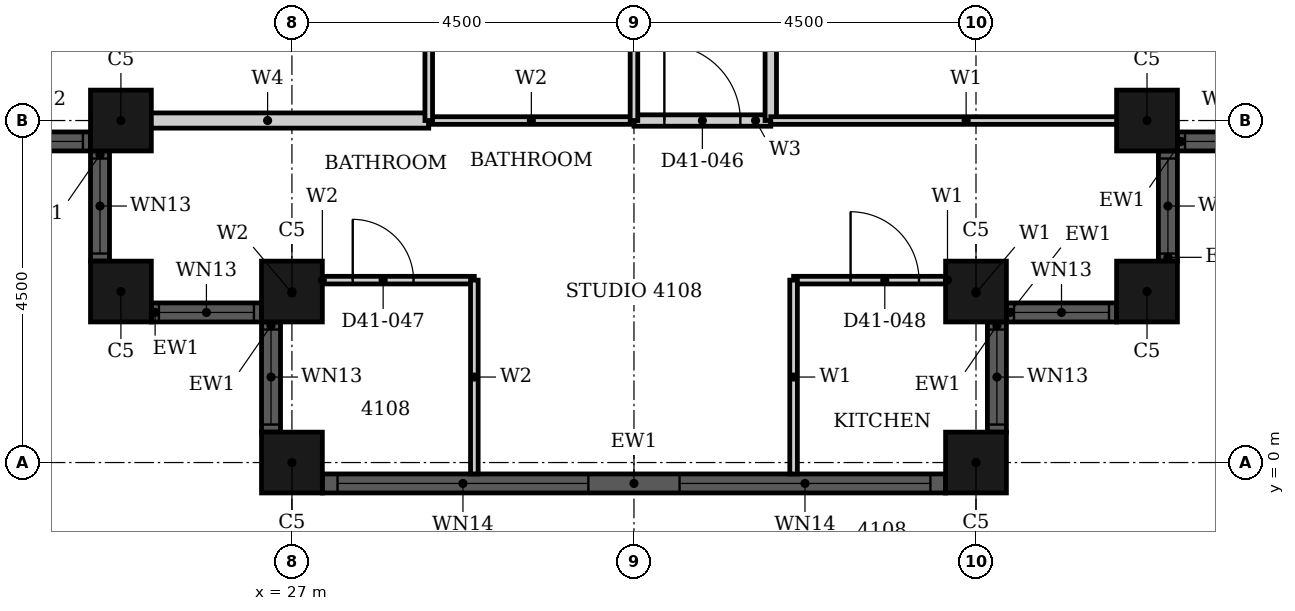
"""IFC4 building model, lengths in metres.
Left out: names, types, materials, properties, quantities, classifications, styles, units other than length and angle.
Written with IfcOpenShell. Run it as: python <this file> out.ifc"""

import sys

from ifc_helpers import new_model, si_unit, direction, frame, frame_2d, origin, origin_2d, place, context, subcontext, project, spatial, rectangle, hollow_rectangle, extrude, element, fill, save


model = new_model("IFC4")
c1 = context("Model", 3, precision=1e-05, world=origin(), true_north=direction((0.0, 1.0)))
c2 = subcontext(c1, "Body", "Model", "MODEL_VIEW")
j1 = project(units=[si_unit("LENGTHUNIT", "METRE"), si_unit("PLANEANGLEUNIT", "RADIAN")], contexts=[c1])
p1 = place(None, origin())
s1 = spatial("IfcSite", under=j1, at=p1, CompositionType="ELEMENT")
p2 = place(p1, origin())
s2 = spatial("IfcBuilding", under=s1, at=p2, CompositionType="ELEMENT")
p3 = place(p2, frame((0.0, 0.0, 165.4)))
s3 = spatial("IfcBuildingStorey", under=s2, at=p3, CompositionType="ELEMENT", Elevation=165.4)
for number, where, z_axis, x_axis in (
    (1, (24.75, 4.5, 0.0), (0.0, 0.0, 1.0), (1.0, 0.0, 0.0)),
    (2, (24.75, 2.25, 0.0), (0.0, 0.0, 1.0), (1.0, 0.0, 0.0)),
    (3, (27.0, 2.25, 0.0), (0.0, 0.0, 1.0), (1.0, 0.0, 0.0)),
    (4, (27.0, 0.0, 0.0), (0.0, 0.0, 1.0), (1.0, 0.0, 0.0)),
    (5, (36.0, 0.0, 0.0), (0.0, 0.0, 1.0), (1.0, 0.0, 0.0)),
    (6, (36.0, 2.25, 0.0), (0.0, 0.0, 1.0), (1.0, 0.0, 0.0)),
    (7, (38.25, 2.25, 0.0), (0.0, 0.0, 1.0), (1.0, 0.0, 0.0)),
    (8, (38.25, 4.5, 0.0), (0.0, 0.0, 1.0), (1.0, 0.0, 0.0)),
):
    element("IfcColumn", number, at=place(p3, frame(where, z_axis=z_axis, x_axis=x_axis)), inside=s3, PredefinedType="COLUMN", context=c2, shape_type="SweptSolid", body=[
        extrude(hollow_rectangle(XDim=0.8, YDim=0.8, WallThickness=0.025, at=origin_2d()), origin(), (0.0, 0.0, 1.0), 3.7),
    ])
p4 = place(p3, frame((22.9, 4.225, 0.0), z_axis=(0.0, 0.0, 1.0), x_axis=(1.0, 0.0, 0.0)))
e9 = element("IfcWall", 9, at=p4, inside=s3, PredefinedType="SOLIDWALL", context=c2, shape_type="SweptSolid", body=[
    extrude(rectangle(XDim=1.45, YDim=0.25, at=frame_2d((0.725, 0.0))), origin(), (0.0, 0.0, 1.0), 3.7),
])
p5 = place(p4, frame((0.1, 0.0, 0.9)))
e10 = element("IfcOpeningElement", 10, at=p5, cuts=e9, PredefinedType="OPENING", context=c2, shape_type="SweptSolid", body=[
    extrude(rectangle(XDim=1.25, YDim=2.08, at=frame_2d((0.625, 1.04))), frame((0.0, 0.135, 0.0), z_axis=(0.0, -1.0, 0.0), x_axis=(1.0, 0.0, 0.0)), (0.0, 0.0, 1.0), 0.27),
])
p6 = place(p3, frame((24.475, 4.1, 0.0), z_axis=(0.0, 0.0, 1.0), x_axis=(0.0, -1.0, 0.0)))
e11 = element("IfcWall", 11, at=p6, inside=s3, PredefinedType="SOLIDWALL", context=c2, shape_type="SweptSolid", body=[
    extrude(rectangle(XDim=1.45, YDim=0.25, at=frame_2d((0.725, 0.0))), origin(), (0.0, 0.0, 1.0), 3.7),
])
p7 = place(p6, frame((0.1, 0.0, 0.9)))
e12 = element("IfcOpeningElement", 12, at=p7, cuts=e11, PredefinedType="OPENING", context=c2, shape_type="SweptSolid", body=[
    extrude(rectangle(XDim=1.25, YDim=1.85, at=frame_2d((0.625, 0.925))), frame((0.0, 0.135, 0.0), z_axis=(0.0, -1.0, 0.0), x_axis=(1.0, 0.0, 0.0)), (0.0, 0.0, 1.0), 0.27),
])
p8 = place(p3, frame((25.15, 1.975, 0.0), z_axis=(0.0, 0.0, 1.0), x_axis=(1.0, 0.0, 0.0)))
e13 = element("IfcWall", 13, at=p8, inside=s3, PredefinedType="SOLIDWALL", context=c2, shape_type="SweptSolid", body=[
    extrude(rectangle(XDim=1.45, YDim=0.25, at=frame_2d((0.725, 0.0))), origin(), (0.0, 0.0, 1.0), 3.7),
])
p9 = place(p8, frame((0.1, 0.0, 0.9)))
e14 = element("IfcOpeningElement", 14, at=p9, cuts=e13, PredefinedType="OPENING", context=c2, shape_type="SweptSolid", body=[
    extrude(rectangle(XDim=1.25, YDim=1.85, at=frame_2d((0.625, 0.925))), frame((0.0, 0.135, 0.0), z_axis=(0.0, -1.0, 0.0), x_axis=(1.0, 0.0, 0.0)), (0.0, 0.0, 1.0), 0.27),
])
p10 = place(p3, frame((26.725, 1.85, 0.0), z_axis=(0.0, 0.0, 1.0), x_axis=(0.0, -1.0, 0.0)))
e15 = element("IfcWall", 15, at=p10, inside=s3, PredefinedType="SOLIDWALL", context=c2, shape_type="SweptSolid", body=[
    extrude(rectangle(XDim=1.45, YDim=0.25, at=frame_2d((0.725, 0.0))), origin(), (0.0, 0.0, 1.0), 3.7),
])
p11 = place(p10, frame((0.1, 0.0, 0.9)))
e16 = element("IfcOpeningElement", 16, at=p11, cuts=e15, PredefinedType="OPENING", context=c2, shape_type="SweptSolid", body=[
    extrude(rectangle(XDim=1.25, YDim=1.85, at=frame_2d((0.625, 0.925))), frame((0.0, 0.135, 0.0), z_axis=(0.0, -1.0, 0.0), x_axis=(1.0, 0.0, 0.0)), (0.0, 0.0, 1.0), 0.27),
])
p12 = place(p3, frame((27.4, -0.275, 0.0), z_axis=(0.0, 0.0, 1.0), x_axis=(1.0, 0.0, 0.0)))
e17 = element("IfcWall", 17, at=p12, inside=s3, PredefinedType="SOLIDWALL", context=c2, shape_type="SweptSolid", body=[
    extrude(rectangle(XDim=8.2, YDim=0.25, at=frame_2d((4.1, 0.0))), origin(), (0.0, 0.0, 1.0), 3.7),
])
p13 = place(p12, frame((0.2, 0.0, 0.45)))
e18 = element("IfcOpeningElement", 18, at=p13, cuts=e17, PredefinedType="OPENING", context=c2, shape_type="SweptSolid", body=[
    extrude(rectangle(XDim=3.3, YDim=2.53, at=frame_2d((1.65, 1.265))), frame((0.0, 0.135, 0.0), z_axis=(0.0, -1.0, 0.0), x_axis=(1.0, 0.0, 0.0)), (0.0, 0.0, 1.0), 0.27),
])
p14 = place(p12, frame((4.7, 0.0, 0.45)))
e19 = element("IfcOpeningElement", 19, at=p14, cuts=e17, PredefinedType="OPENING", context=c2, shape_type="SweptSolid", body=[
    extrude(rectangle(XDim=3.3, YDim=2.53, at=frame_2d((1.65, 1.265))), frame((0.0, 0.135, 0.0), z_axis=(0.0, -1.0, 0.0), x_axis=(1.0, 0.0, 0.0)), (0.0, 0.0, 1.0), 0.27),
])
p15 = place(p3, frame((36.275, 0.4, 0.0), z_axis=(0.0, 0.0, 1.0), x_axis=(0.0, 1.0, 0.0)))
e20 = element("IfcWall", 20, at=p15, inside=s3, PredefinedType="SOLIDWALL", context=c2, shape_type="SweptSolid", body=[
    extrude(rectangle(XDim=1.45, YDim=0.25, at=frame_2d((0.725, 0.0))), origin(), (0.0, 0.0, 1.0), 3.7),
])
p16 = place(p15, frame((0.1, 0.0, 0.9)))
e21 = element("IfcOpeningElement", 21, at=p16, cuts=e20, PredefinedType="OPENING", context=c2, shape_type="SweptSolid", body=[
    extrude(rectangle(XDim=1.25, YDim=1.85, at=frame_2d((0.625, 0.925))), frame((0.0, 0.135, 0.0), z_axis=(0.0, -1.0, 0.0), x_axis=(1.0, 0.0, 0.0)), (0.0, 0.0, 1.0), 0.27),
])
p17 = place(p3, frame((36.4, 1.975, 0.0), z_axis=(0.0, 0.0, 1.0), x_axis=(1.0, 0.0, 0.0)))
e22 = element("IfcWall", 22, at=p17, inside=s3, PredefinedType="SOLIDWALL", context=c2, shape_type="SweptSolid", body=[
    extrude(rectangle(XDim=1.45, YDim=0.25, at=frame_2d((0.725, 0.0))), origin(), (0.0, 0.0, 1.0), 3.7),
])
p18 = place(p17, frame((0.1, 0.0, 0.9)))
e23 = element("IfcOpeningElement", 23, at=p18, cuts=e22, PredefinedType="OPENING", context=c2, shape_type="SweptSolid", body=[
    extrude(rectangle(XDim=1.25, YDim=1.85, at=frame_2d((0.625, 0.925))), frame((0.0, 0.135, 0.0), z_axis=(0.0, -1.0, 0.0), x_axis=(1.0, 0.0, 0.0)), (0.0, 0.0, 1.0), 0.27),
])
p19 = place(p3, frame((38.525, 2.65, 0.0), z_axis=(0.0, 0.0, 1.0), x_axis=(0.0, 1.0, 0.0)))
e24 = element("IfcWall", 24, at=p19, inside=s3, PredefinedType="SOLIDWALL", context=c2, shape_type="SweptSolid", body=[
    extrude(rectangle(XDim=1.45, YDim=0.25, at=frame_2d((0.725, 0.0))), origin(), (0.0, 0.0, 1.0), 3.7),
])
p20 = place(p19, frame((0.1, 0.0, 0.9)))
e25 = element("IfcOpeningElement", 25, at=p20, cuts=e24, PredefinedType="OPENING", context=c2, shape_type="SweptSolid", body=[
    extrude(rectangle(XDim=1.25, YDim=1.85, at=frame_2d((0.625, 0.925))), frame((0.0, 0.135, 0.0), z_axis=(0.0, -1.0, 0.0), x_axis=(1.0, 0.0, 0.0)), (0.0, 0.0, 1.0), 0.27),
])
p21 = place(p3, frame((38.65, 4.225, 0.0), z_axis=(0.0, 0.0, 1.0), x_axis=(1.0, 0.0, 0.0)))
e26 = element("IfcWall", 26, at=p21, inside=s3, PredefinedType="SOLIDWALL", context=c2, shape_type="SweptSolid", body=[
    extrude(rectangle(XDim=1.45, YDim=0.25, at=frame_2d((0.725, 0.0))), origin(), (0.0, 0.0, 1.0), 3.7),
])
p22 = place(p21, frame((0.1, 0.0, 0.9)))
e27 = element("IfcOpeningElement", 27, at=p22, cuts=e26, PredefinedType="OPENING", context=c2, shape_type="SweptSolid", body=[
    extrude(rectangle(XDim=1.25, YDim=2.08, at=frame_2d((0.625, 1.04))), frame((0.0, 0.135, 0.0), z_axis=(0.0, -1.0, 0.0), x_axis=(1.0, 0.0, 0.0)), (0.0, 0.0, 1.0), 0.27),
])
p23 = place(p3, frame((31.5, 4.5, 0.0), z_axis=(0.0, 0.0, 1.0), x_axis=(1.0, 0.0, 0.0)))
e28 = element("IfcWall", 28, at=p23, inside=s3, PredefinedType="PARTITIONING", context=c2, shape_type="SweptSolid", body=[
    extrude(rectangle(XDim=1.8, YDim=0.15, at=frame_2d((0.9, 0.0))), origin(), (0.0, 0.0, 1.0), 3.4),
])
p24 = place(p23, frame((0.4, 0.0, 0.0)))
e29 = element("IfcOpeningElement", 29, at=p24, cuts=e28, PredefinedType="OPENING", context=c2, shape_type="SweptSolid", body=[
    extrude(rectangle(XDim=1.0, YDim=2.2, at=frame_2d((0.5, 1.1))), frame((0.0, 0.085, 0.0), z_axis=(0.0, -1.0, 0.0), x_axis=(1.0, 0.0, 0.0)), (0.0, 0.0, 1.0), 0.17),
])
p25 = place(p3, frame((33.3, 4.5, 0.0), z_axis=(0.0, 0.0, 1.0), x_axis=(0.0, 1.0, 0.0)))
e30 = element("IfcWall", 30, at=p25, inside=s3, PredefinedType="PARTITIONING", context=c2, shape_type="SweptSolid", body=[
    extrude(rectangle(XDim=16.199, YDim=0.15, at=frame_2d((8.1, 0.0))), origin(), (0.0, 0.0, 1.0), 3.4),
])
p26 = place(p25, frame((12.099, 0.0, 0.0)))
e31 = element("IfcOpeningElement", 31, at=p26, cuts=e30, PredefinedType="OPENING", context=c2, shape_type="SweptSolid", body=[
    extrude(rectangle(XDim=1.0, YDim=2.2, at=frame_2d((0.5, 1.1))), frame((0.0, 0.085, 0.0), z_axis=(0.0, -1.0, 0.0), x_axis=(1.0, 0.0, 0.0)), (0.0, 0.0, 1.0), 0.17),
])
p27 = place(p25, frame((4.0, 0.0, 0.0)))
e32 = element("IfcOpeningElement", 32, at=p27, cuts=e30, PredefinedType="OPENING", context=c2, shape_type="SweptSolid", body=[
    extrude(rectangle(XDim=1.0, YDim=2.1, at=frame_2d((0.5, 1.05))), frame((0.0, 0.085, 0.0), z_axis=(0.0, -1.0, 0.0), x_axis=(1.0, 0.0, 0.0)), (0.0, 0.0, 1.0), 0.17),
])
p28 = place(p3, frame((33.6, 2.4, 0.0), z_axis=(0.0, 0.0, 1.0), x_axis=(1.0, 0.0, 0.0)))
e33 = element("IfcWall", 33, at=p28, inside=s3, PredefinedType="PARTITIONING", context=c2, shape_type="SweptSolid", body=[
    extrude(rectangle(XDim=2.4, YDim=0.1, at=frame_2d((1.2, 0.0))), origin(), (0.0, 0.0, 1.0), 3.4),
])
p29 = place(p28, frame((0.75, 0.0, 0.0)))
e34 = element("IfcOpeningElement", 34, at=p29, cuts=e33, PredefinedType="OPENING", context=c2, shape_type="SweptSolid", body=[
    extrude(rectangle(XDim=0.9, YDim=2.1, at=frame_2d((0.45, 1.05))), frame((0.0, 0.06, 0.0), z_axis=(0.0, -1.0, 0.0), x_axis=(1.0, 0.0, 0.0)), (0.0, 0.0, 1.0), 0.12),
])
p30 = place(p3, frame((33.3, 4.5, 0.0), z_axis=(0.0, 0.0, 1.0), x_axis=(1.0, 0.0, 0.0)))
e35 = element("IfcWall", 35, at=p30, inside=s3, PredefinedType="PARTITIONING", context=c2, shape_type="SweptSolid", body=[
    extrude(rectangle(XDim=5.14, YDim=0.1, at=frame_2d((2.57, 0.0))), origin(), (0.0, 0.0, 1.0), 3.4),
])
p31 = place(p3, frame((33.6, -0.15, 0.0), z_axis=(0.0, 0.0, 1.0), x_axis=(0.0, 1.0, 0.0)))
e36 = element("IfcWall", 36, at=p31, inside=s3, PredefinedType="PARTITIONING", context=c2, shape_type="SweptSolid", body=[
    extrude(rectangle(XDim=2.55, YDim=0.1, at=frame_2d((1.275, 0.0))), origin(), (0.0, 0.0, 1.0), 3.4),
])
p32 = place(p3, frame((36.0, 2.06, 0.0), z_axis=(0.0, 0.0, 1.0), x_axis=(0.0, 1.0, 0.0)))
e37 = element("IfcWall", 37, at=p32, inside=s3, PredefinedType="PARTITIONING", context=c2, shape_type="SweptSolid", body=[
    extrude(rectangle(XDim=0.34, YDim=0.1, at=frame_2d((0.17, 0.0))), origin(), (0.0, 0.0, 1.0), 3.4),
])
p33 = place(p3, frame((24.56, 4.5, 0.0), z_axis=(0.0, 0.0, 1.0), x_axis=(1.0, 0.0, 0.0)))
e38 = element("IfcWall", 38, at=p33, inside=s3, PredefinedType="PARTITIONING", context=c2, shape_type="SweptSolid", body=[
    extrude(rectangle(XDim=4.24, YDim=0.2, at=frame_2d((2.12, 0.0))), origin(), (0.0, 0.0, 1.0), 3.4),
])
p34 = place(p3, frame((27.0, 2.4, 0.0), z_axis=(0.0, 0.0, 1.0), x_axis=(1.0, 0.0, 0.0)))
e39 = element("IfcWall", 39, at=p34, inside=s3, PredefinedType="PARTITIONING", context=c2, shape_type="SweptSolid", body=[
    extrude(rectangle(XDim=2.4, YDim=0.1, at=frame_2d((1.2, 0.0))), origin(), (0.0, 0.0, 1.0), 3.4),
])
p35 = place(p34, frame((0.8, 0.0, 0.0)))
e40 = element("IfcOpeningElement", 40, at=p35, cuts=e39, PredefinedType="OPENING", context=c2, shape_type="SweptSolid", body=[
    extrude(rectangle(XDim=0.8, YDim=2.1, at=frame_2d((0.4, 1.05))), frame((0.0, 0.06, 0.0), z_axis=(0.0, -1.0, 0.0), x_axis=(1.0, 0.0, 0.0)), (0.0, 0.0, 1.0), 0.12),
])
p36 = place(p3, frame((28.8, 4.5, 0.0), z_axis=(0.0, 0.0, 1.0), x_axis=(1.0, 0.0, 0.0)))
e41 = element("IfcWall", 41, at=p36, inside=s3, PredefinedType="PARTITIONING", context=c2, shape_type="SweptSolid", body=[
    extrude(rectangle(XDim=2.7, YDim=0.1, at=frame_2d((1.35, 0.0))), origin(), (0.0, 0.0, 1.0), 3.4),
])
p37 = place(p3, frame((27.0, 2.06, 0.0), z_axis=(0.0, 0.0, 1.0), x_axis=(0.0, 1.0, 0.0)))
e42 = element("IfcWall", 42, at=p37, inside=s3, PredefinedType="PARTITIONING", context=c2, shape_type="SweptSolid", body=[
    extrude(rectangle(XDim=0.34, YDim=0.1, at=frame_2d((0.17, 0.0))), origin(), (0.0, 0.0, 1.0), 3.4),
])
p38 = place(p3, frame((28.8, 4.5, 0.0), z_axis=(0.0, 0.0, 1.0), x_axis=(0.0, 1.0, 0.0)))
e43 = element("IfcWall", 43, at=p38, inside=s3, PredefinedType="PARTITIONING", context=c2, shape_type="SweptSolid", body=[
    extrude(rectangle(XDim=2.4, YDim=0.1, at=frame_2d((1.2, 0.0))), origin(), (0.0, 0.0, 1.0), 3.4),
])
p39 = place(p3, frame((29.4, -0.15, 0.0), z_axis=(0.0, 0.0, 1.0), x_axis=(0.0, 1.0, 0.0)))
e44 = element("IfcWall", 44, at=p39, inside=s3, PredefinedType="PARTITIONING", context=c2, shape_type="SweptSolid", body=[
    extrude(rectangle(XDim=2.55, YDim=0.1, at=frame_2d((1.275, 0.0))), origin(), (0.0, 0.0, 1.0), 3.4),
])
p40 = place(p3, frame((31.5, 4.5, 0.0), z_axis=(0.0, 0.0, 1.0), x_axis=(0.0, 1.0, 0.0)))
e45 = element("IfcWall", 45, at=p40, inside=s3, PredefinedType="PARTITIONING", context=c2, shape_type="SweptSolid", body=[
    extrude(rectangle(XDim=2.4, YDim=0.1, at=frame_2d((1.2, 0.0))), origin(), (0.0, 0.0, 1.0), 2.68),
])
p41 = place(p5, origin())
e46 = element("IfcWindow", 46, at=p41, inside=s3, PartitioningType="SINGLE_PANEL", PredefinedType="WINDOW", context=c2, shape_type="SweptSolid", body=[
    extrude(rectangle(XDim=1.25, YDim=2.08, at=frame_2d((0.625, 1.04))), frame((0.0, 0.03, 0.0), z_axis=(0.0, -1.0, 0.0), x_axis=(1.0, 0.0, 0.0)), (0.0, 0.0, 1.0), 0.06),
])
fill(e10, e46)
p42 = place(p7, origin())
e47 = element("IfcWindow", 47, at=p42, inside=s3, PartitioningType="SINGLE_PANEL", PredefinedType="WINDOW", context=c2, shape_type="SweptSolid", body=[
    extrude(rectangle(XDim=1.25, YDim=1.85, at=frame_2d((0.625, 0.925))), frame((0.0, 0.03, 0.0), z_axis=(0.0, -1.0, 0.0), x_axis=(1.0, 0.0, 0.0)), (0.0, 0.0, 1.0), 0.06),
])
fill(e12, e47)
p43 = place(p9, origin())
e48 = element("IfcWindow", 48, at=p43, inside=s3, PartitioningType="SINGLE_PANEL", PredefinedType="WINDOW", context=c2, shape_type="SweptSolid", body=[
    extrude(rectangle(XDim=1.25, YDim=1.85, at=frame_2d((0.625, 0.925))), frame((0.0, 0.03, 0.0), z_axis=(0.0, -1.0, 0.0), x_axis=(1.0, 0.0, 0.0)), (0.0, 0.0, 1.0), 0.06),
])
fill(e14, e48)
p44 = place(p11, origin())
e49 = element("IfcWindow", 49, at=p44, inside=s3, PartitioningType="SINGLE_PANEL", PredefinedType="WINDOW", context=c2, shape_type="SweptSolid", body=[
    extrude(rectangle(XDim=1.25, YDim=1.85, at=frame_2d((0.625, 0.925))), frame((0.0, 0.03, 0.0), z_axis=(0.0, -1.0, 0.0), x_axis=(1.0, 0.0, 0.0)), (0.0, 0.0, 1.0), 0.06),
])
fill(e16, e49)
p45 = place(p13, origin())
e50 = element("IfcWindow", 50, at=p45, inside=s3, PartitioningType="SINGLE_PANEL", PredefinedType="WINDOW", context=c2, shape_type="SweptSolid", body=[
    extrude(rectangle(XDim=3.3, YDim=2.53, at=frame_2d((1.65, 1.265))), frame((0.0, 0.03, 0.0), z_axis=(0.0, -1.0, 0.0), x_axis=(1.0, 0.0, 0.0)), (0.0, 0.0, 1.0), 0.06),
])
fill(e18, e50)
p46 = place(p14, origin())
e51 = element("IfcWindow", 51, at=p46, inside=s3, PartitioningType="SINGLE_PANEL", PredefinedType="WINDOW", context=c2, shape_type="SweptSolid", body=[
    extrude(rectangle(XDim=3.3, YDim=2.53, at=frame_2d((1.65, 1.265))), frame((0.0, 0.03, 0.0), z_axis=(0.0, -1.0, 0.0), x_axis=(1.0, 0.0, 0.0)), (0.0, 0.0, 1.0), 0.06),
])
fill(e19, e51)
p47 = place(p16, origin())
e52 = element("IfcWindow", 52, at=p47, inside=s3, PartitioningType="SINGLE_PANEL", PredefinedType="WINDOW", context=c2, shape_type="SweptSolid", body=[
    extrude(rectangle(XDim=1.25, YDim=1.85, at=frame_2d((0.625, 0.925))), frame((0.0, 0.03, 0.0), z_axis=(0.0, -1.0, 0.0), x_axis=(1.0, 0.0, 0.0)), (0.0, 0.0, 1.0), 0.06),
])
fill(e21, e52)
p48 = place(p18, origin())
e53 = element("IfcWindow", 53, at=p48, inside=s3, PartitioningType="SINGLE_PANEL", PredefinedType="WINDOW", context=c2, shape_type="SweptSolid", body=[
    extrude(rectangle(XDim=1.25, YDim=1.85, at=frame_2d((0.625, 0.925))), frame((0.0, 0.03, 0.0), z_axis=(0.0, -1.0, 0.0), x_axis=(1.0, 0.0, 0.0)), (0.0, 0.0, 1.0), 0.06),
])
fill(e23, e53)
p49 = place(p20, origin())
e54 = element("IfcWindow", 54, at=p49, inside=s3, PartitioningType="SINGLE_PANEL", PredefinedType="WINDOW", context=c2, shape_type="SweptSolid", body=[
    extrude(rectangle(XDim=1.25, YDim=1.85, at=frame_2d((0.625, 0.925))), frame((0.0, 0.03, 0.0), z_axis=(0.0, -1.0, 0.0), x_axis=(1.0, 0.0, 0.0)), (0.0, 0.0, 1.0), 0.06),
])
fill(e25, e54)
p50 = place(p22, origin())
e55 = element("IfcWindow", 55, at=p50, inside=s3, PartitioningType="SINGLE_PANEL", PredefinedType="WINDOW", context=c2, shape_type="SweptSolid", body=[
    extrude(rectangle(XDim=1.25, YDim=2.08, at=frame_2d((0.625, 1.04))), frame((0.0, 0.03, 0.0), z_axis=(0.0, -1.0, 0.0), x_axis=(1.0, 0.0, 0.0)), (0.0, 0.0, 1.0), 0.06),
])
fill(e27, e55)
p51 = place(p24, origin())
e56 = element("IfcDoor", 56, at=p51, inside=s3, OperationType="SINGLE_SWING_LEFT", PredefinedType="DOOR", context=c2, shape_type="SweptSolid", body=[
    extrude(rectangle(XDim=1.0, YDim=2.2, at=frame_2d((0.5, 1.1))), frame((0.0, 0.025, 0.0), z_axis=(0.0, -1.0, 0.0), x_axis=(1.0, 0.0, 0.0)), (0.0, 0.0, 1.0), 0.05),
])
fill(e29, e56)
p52 = place(p35, origin())
e57 = element("IfcDoor", 57, at=p52, inside=s3, OperationType="SINGLE_SWING_RIGHT", PredefinedType="DOOR", context=c2, shape_type="SweptSolid", body=[
    extrude(rectangle(XDim=0.8, YDim=2.1, at=frame_2d((0.4, 1.05))), frame((0.0, 0.025, 0.0), z_axis=(0.0, -1.0, 0.0), x_axis=(1.0, 0.0, 0.0)), (0.0, 0.0, 1.0), 0.05),
])
fill(e40, e57)
p53 = place(p29, origin())
e58 = element("IfcDoor", 58, at=p53, inside=s3, OperationType="SINGLE_SWING_LEFT", PredefinedType="DOOR", context=c2, shape_type="SweptSolid", body=[
    extrude(rectangle(XDim=0.9, YDim=2.1, at=frame_2d((0.45, 1.05))), frame((0.0, 0.025, 0.0), z_axis=(0.0, -1.0, 0.0), x_axis=(1.0, 0.0, 0.0)), (0.0, 0.0, 1.0), 0.05),
])
fill(e34, e58)
save(model, sys.argv[1])
